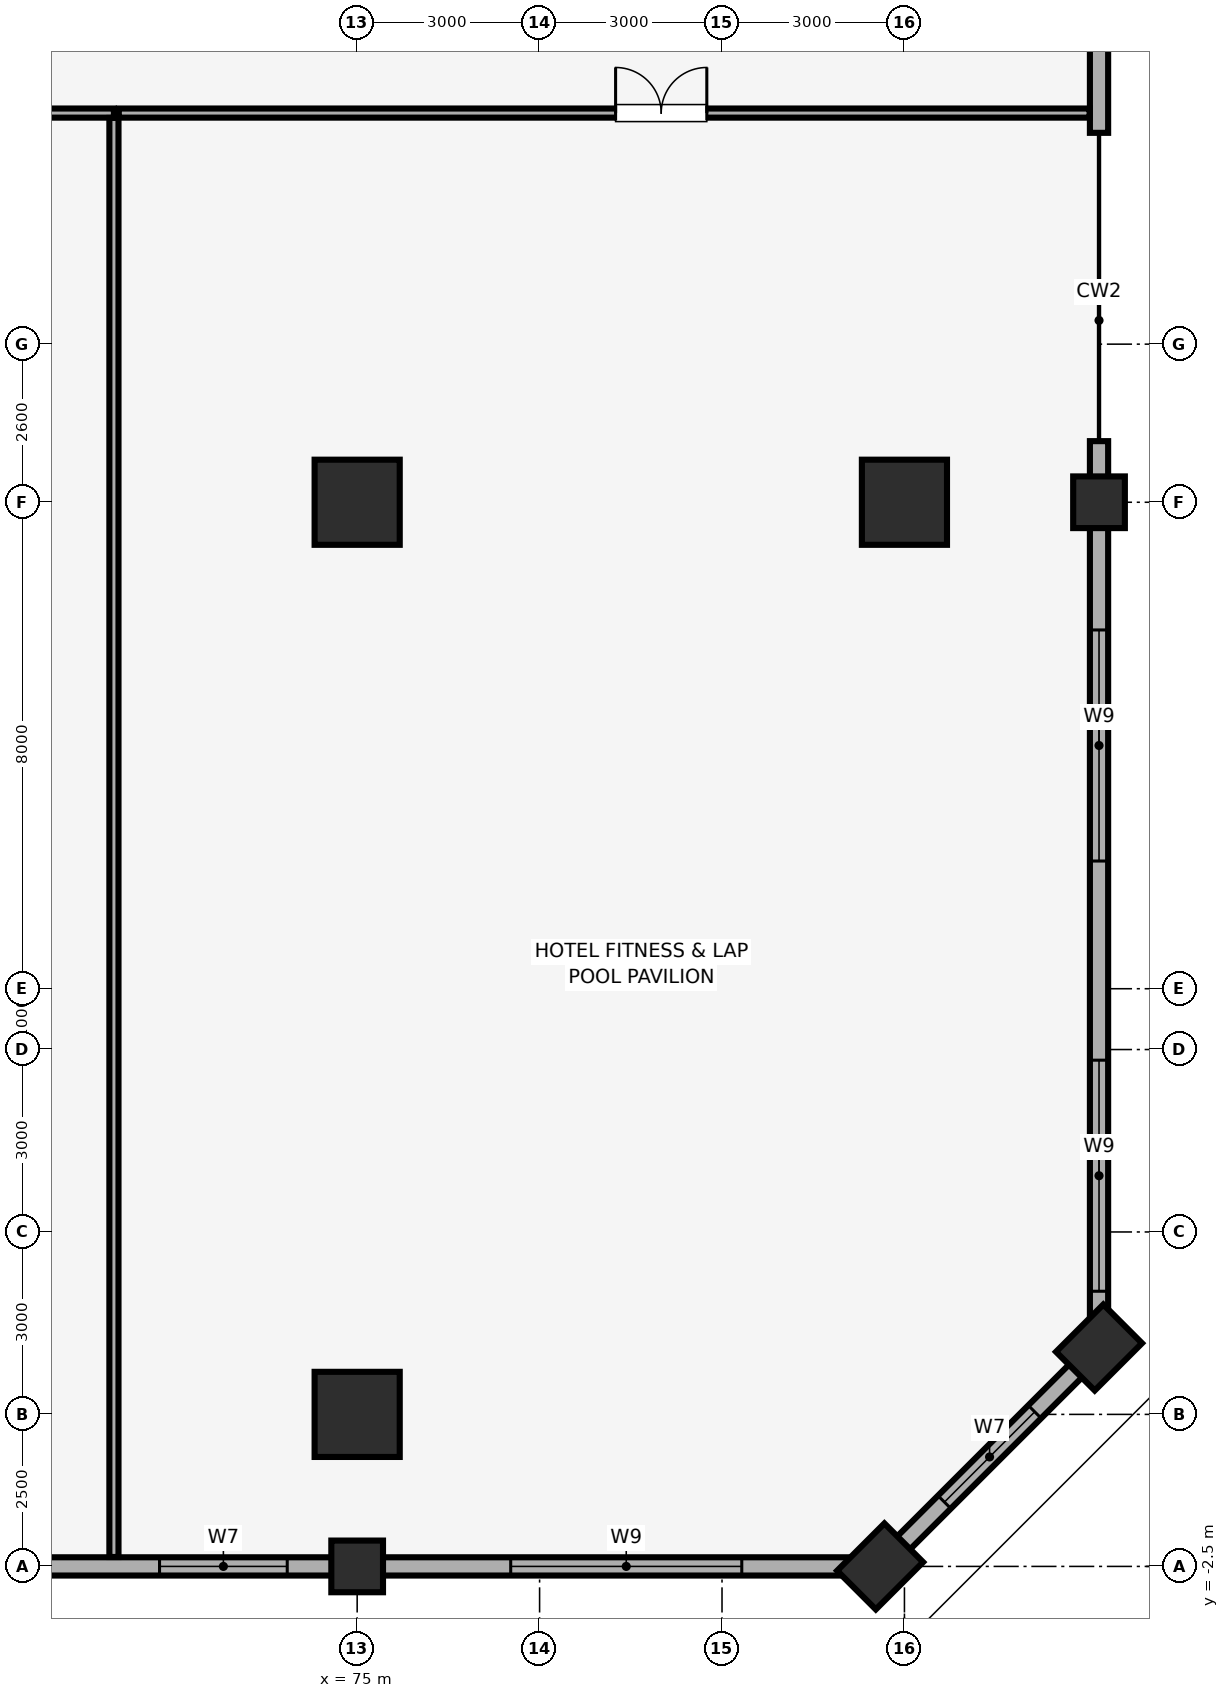
"""IFC4 building model, lengths in metres.
Left out: names, types, materials, properties, quantities, classifications, styles, units other than length and angle.
Written with IfcOpenShell. Run it as: python <this file> out.ifc"""

import sys

from ifc_helpers import new_model, si_unit, direction, frame, frame_2d, origin, origin_2d, place, context, subcontext, project, spatial, rectangle, extrude, element, fill, save


model = new_model("IFC4")
c1 = context("Model", 3, precision=1e-05, world=origin(), true_north=direction((0.0, 1.0)))
c2 = subcontext(c1, "Body", "Model", "MODEL_VIEW")
j1 = project(units=[si_unit("LENGTHUNIT", "METRE"), si_unit("PLANEANGLEUNIT", "RADIAN")], contexts=[c1])
p1 = place(None, origin())
s1 = spatial("IfcSite", under=j1, at=p1, CompositionType="ELEMENT")
p2 = place(p1, origin())
s2 = spatial("IfcBuilding", under=s1, at=p2, CompositionType="ELEMENT")
p3 = place(p2, frame((0.0, 0.0, 26.0)))
s3 = spatial("IfcBuildingStorey", under=s2, at=p3, CompositionType="ELEMENT", Elevation=26.0)
for number, where, z_axis, x_axis in (
    (1, (75.0, -2.5, 0.0), (0.0, 0.0, 1.0), (1.0, 0.0, 0.0)),
    (2, (87.2, 15.0, 0.0), (0.0, 0.0, 1.0), (1.0, 0.0, 0.0)),
):
    element("IfcColumn", number, at=place(p3, frame(where, z_axis=z_axis, x_axis=x_axis)), inside=s3, PredefinedType="COLUMN", context=c2, shape_type="SweptSolid", body=[
        extrude(rectangle(XDim=0.85, YDim=0.85, at=origin_2d()), origin(), (0.0, 0.0, 1.0), 5.16),
    ])
for number, where, z_axis, x_axis in (
    (3, (83.6, -2.5, 0.0), (0.0, 0.0, 1.0), (0.707, 0.707, 0.0)),
    (4, (87.2, 1.1, 0.0), (0.0, 0.0, 1.0), (0.707, 0.707, 0.0)),
):
    element("IfcColumn", number, at=place(p3, frame(where, z_axis=z_axis, x_axis=x_axis)), inside=s3, PredefinedType="PILASTER", context=c2, shape_type="SweptSolid", body=[
        extrude(rectangle(XDim=1.1, YDim=0.9, at=origin_2d()), origin(), (0.0, 0.0, 1.0), 5.16),
    ])
for number, where, z_axis, x_axis in (
    (5, (75.0, 0.0, 0.0), (0.0, 0.0, 1.0), (1.0, 0.0, 0.0)),
    (6, (75.0, 15.0, 0.0), (0.0, 0.0, 1.0), (1.0, 0.0, 0.0)),
    (7, (84.0, 15.0, 0.0), (0.0, 0.0, 1.0), (1.0, 0.0, 0.0)),
):
    element("IfcColumn", number, at=place(p3, frame(where, z_axis=z_axis, x_axis=x_axis)), inside=s3, PredefinedType="COLUMN", context=c2, shape_type="SweptSolid", body=[
        extrude(rectangle(XDim=1.4, YDim=1.4, at=origin_2d()), origin(), (0.0, 0.0, 1.0), 5.16),
    ])
p4 = place(p3, frame((66.875, -2.5, 0.0), z_axis=(0.0, 0.0, 1.0), x_axis=(1.0, 0.0, 0.0)))
e8 = element("IfcWall", 8, at=p4, inside=s3, PredefinedType="SOLIDWALL", context=c2, shape_type="SweptSolid", body=[
    extrude(rectangle(XDim=16.725, YDim=0.3, at=frame_2d((8.363, 0.0))), origin(), (0.0, 0.0, 1.0), 5.12),
])
p5 = place(p4, frame((4.875, 0.0, 0.85)))
e9 = element("IfcOpeningElement", 9, at=p5, cuts=e8, PredefinedType="OPENING", context=c2, shape_type="SweptSolid", body=[
    extrude(rectangle(XDim=2.1, YDim=1.6, at=frame_2d((1.05, 0.8))), frame((0.0, 0.16, 0.0), z_axis=(0.0, -1.0, 0.0), x_axis=(1.0, 0.0, 0.0)), (0.0, 0.0, 1.0), 0.32),
])
p6 = place(p4, frame((10.65, 0.0, 0.85)))
e10 = element("IfcOpeningElement", 10, at=p6, cuts=e8, PredefinedType="OPENING", context=c2, shape_type="SweptSolid", body=[
    extrude(rectangle(XDim=3.8, YDim=2.2, at=frame_2d((1.9, 1.1))), frame((0.0, 0.16, 0.0), z_axis=(0.0, -1.0, 0.0), x_axis=(1.0, 0.0, 0.0)), (0.0, 0.0, 1.0), 0.32),
])
p7 = place(p3, frame((83.6, -2.5, 0.0), z_axis=(0.0, 0.0, 1.0), x_axis=(0.707082803744, 0.707130757816, 0.0)))
e11 = element("IfcWall", 11, at=p7, inside=s3, PredefinedType="SOLIDWALL", context=c2, shape_type="SweptSolid", body=[
    extrude(rectangle(XDim=5.091, YDim=0.3, at=frame_2d((2.545, 0.0))), origin(), (0.0, 0.0, 1.0), 5.12),
])
p8 = place(p7, frame((1.496, 0.0, 0.85)))
e12 = element("IfcOpeningElement", 12, at=p8, cuts=e11, PredefinedType="OPENING", context=c2, shape_type="SweptSolid", body=[
    extrude(rectangle(XDim=2.1, YDim=1.6, at=frame_2d((1.05, 0.8))), frame((0.0, 0.16, 0.0), z_axis=(0.0, -1.0, 0.0), x_axis=(1.0, 0.0, 0.0)), (0.0, 0.0, 1.0), 0.32),
])
p9 = place(p3, frame((87.2, 1.1, 0.0), z_axis=(0.0, 0.0, 1.0), x_axis=(0.0, 1.0, 0.0)))
e13 = element("IfcWall", 13, at=p9, inside=s3, PredefinedType="SOLIDWALL", context=c2, shape_type="SweptSolid", body=[
    extrude(rectangle(XDim=14.905, YDim=0.3, at=frame_2d((7.452, 0.0))), origin(), (0.0, 0.0, 1.0), 5.12),
])
p10 = place(p9, frame((0.925, 0.0, 0.85)))
e14 = element("IfcOpeningElement", 14, at=p10, cuts=e13, PredefinedType="OPENING", context=c2, shape_type="SweptSolid", body=[
    extrude(rectangle(XDim=3.8, YDim=2.2, at=frame_2d((1.9, 1.1))), frame((0.0, 0.16, 0.0), z_axis=(0.0, -1.0, 0.0), x_axis=(1.0, 0.0, 0.0)), (0.0, 0.0, 1.0), 0.32),
])
p11 = place(p9, frame((8.0, 0.0, 0.85)))
e15 = element("IfcOpeningElement", 15, at=p11, cuts=e13, PredefinedType="OPENING", context=c2, shape_type="SweptSolid", body=[
    extrude(rectangle(XDim=3.8, YDim=2.2, at=frame_2d((1.9, 1.1))), frame((0.0, 0.16, 0.0), z_axis=(0.0, -1.0, 0.0), x_axis=(1.0, 0.0, 0.0)), (0.0, 0.0, 1.0), 0.32),
])
p12 = place(p3, frame((87.2, 21.075, 0.0), z_axis=(0.0, 0.0, 1.0), x_axis=(0.0, 1.0, 0.0)))
e16 = element("IfcWall", 16, at=p12, inside=s3, PredefinedType="SOLIDWALL", context=c2, shape_type="SweptSolid", body=[
    extrude(rectangle(XDim=3.05, YDim=0.3, at=frame_2d((1.525, 0.0))), origin(), (0.0, 0.0, 1.0), 5.12),
])
p13 = place(p3, frame((52.58, 21.4, 0.0), z_axis=(0.0, 0.0, 1.0), x_axis=(1.0, 0.0, 0.0)))
e17 = element("IfcWall", 17, at=p13, inside=s3, PredefinedType="PARTITIONING", context=c2, shape_type="SweptSolid", body=[
    extrude(rectangle(XDim=18.42, YDim=0.15, at=frame_2d((9.21, 0.0))), origin(), (0.0, 0.0, 1.0), 5.12),
])
p14 = place(p13, frame((8.67, 0.0, 0.0)))
e18 = element("IfcOpeningElement", 18, at=p14, cuts=e17, PredefinedType="OPENING", context=c2, shape_type="SweptSolid", body=[
    extrude(rectangle(XDim=1.5, YDim=2.25, at=frame_2d((0.75, 1.125))), frame((0.0, 0.085, 0.0), z_axis=(0.0, -1.0, 0.0), x_axis=(1.0, 0.0, 0.0)), (0.0, 0.0, 1.0), 0.17),
])
p15 = place(p3, frame((71.0, -2.345, 0.0), z_axis=(0.0, 0.0, 1.0), x_axis=(0.0, 1.0, 0.0)))
e19 = element("IfcWall", 19, at=p15, inside=s3, PredefinedType="PARTITIONING", context=c2, shape_type="SweptSolid", body=[
    extrude(rectangle(XDim=23.665, YDim=0.15, at=frame_2d((11.833, 0.0))), origin(), (0.0, 0.0, 1.0), 5.12),
])
p16 = place(p3, frame((71.08, 21.4, 0.0), z_axis=(0.0, 0.0, 1.0), x_axis=(1.0, 0.0, 0.0)))
e20 = element("IfcWall", 20, at=p16, inside=s3, PredefinedType="PARTITIONING", context=c2, shape_type="SweptSolid", body=[
    extrude(rectangle(XDim=15.965, YDim=0.15, at=frame_2d((7.982, 0.0))), origin(), (0.0, 0.0, 1.0), 5.12),
])
p17 = place(p16, frame((8.17, 0.0, 0.0)))
e21 = element("IfcOpeningElement", 21, at=p17, cuts=e20, PredefinedType="OPENING", context=c2, shape_type="SweptSolid", body=[
    extrude(rectangle(XDim=1.5, YDim=2.25, at=frame_2d((0.75, 1.125))), frame((0.0, 0.085, 0.0), z_axis=(0.0, -1.0, 0.0), x_axis=(1.0, 0.0, 0.0)), (0.0, 0.0, 1.0), 0.17),
])
p18 = place(p8, origin())
e22 = element("IfcWindow", 22, at=p18, inside=s3, PartitioningType="SINGLE_PANEL", PredefinedType="WINDOW", context=c2, shape_type="SweptSolid", body=[
    extrude(rectangle(XDim=2.1, YDim=1.6, at=frame_2d((1.05, 0.8))), frame((0.0, 0.03, 0.0), z_axis=(0.0, -1.0, 0.0), x_axis=(1.0, 0.0, 0.0)), (0.0, 0.0, 1.0), 0.06),
])
fill(e12, e22)
p19 = place(p5, origin())
e23 = element("IfcWindow", 23, at=p19, inside=s3, PartitioningType="SINGLE_PANEL", PredefinedType="WINDOW", context=c2, shape_type="SweptSolid", body=[
    extrude(rectangle(XDim=2.1, YDim=1.6, at=frame_2d((1.05, 0.8))), frame((0.0, 0.03, 0.0), z_axis=(0.0, -1.0, 0.0), x_axis=(1.0, 0.0, 0.0)), (0.0, 0.0, 1.0), 0.06),
])
fill(e9, e23)
p20 = place(p6, origin())
e24 = element("IfcWindow", 24, at=p20, inside=s3, PartitioningType="SINGLE_PANEL", PredefinedType="WINDOW", context=c2, shape_type="SweptSolid", body=[
    extrude(rectangle(XDim=3.8, YDim=2.2, at=frame_2d((1.9, 1.1))), frame((0.0, 0.03, 0.0), z_axis=(0.0, -1.0, 0.0), x_axis=(1.0, 0.0, 0.0)), (0.0, 0.0, 1.0), 0.06),
])
fill(e10, e24)
p21 = place(p10, origin())
e25 = element("IfcWindow", 25, at=p21, inside=s3, PartitioningType="SINGLE_PANEL", PredefinedType="WINDOW", context=c2, shape_type="SweptSolid", body=[
    extrude(rectangle(XDim=3.8, YDim=2.2, at=frame_2d((1.9, 1.1))), frame((0.0, 0.03, 0.0), z_axis=(0.0, -1.0, 0.0), x_axis=(1.0, 0.0, 0.0)), (0.0, 0.0, 1.0), 0.06),
])
fill(e14, e25)
p22 = place(p11, origin())
e26 = element("IfcWindow", 26, at=p22, inside=s3, PartitioningType="SINGLE_PANEL", PredefinedType="WINDOW", context=c2, shape_type="SweptSolid", body=[
    extrude(rectangle(XDim=3.8, YDim=2.2, at=frame_2d((1.9, 1.1))), frame((0.0, 0.03, 0.0), z_axis=(0.0, -1.0, 0.0), x_axis=(1.0, 0.0, 0.0)), (0.0, 0.0, 1.0), 0.06),
])
fill(e15, e26)
p23 = place(p17, origin())
e27 = element("IfcDoor", 27, at=p23, inside=s3, OperationType="DOUBLE_DOOR_SINGLE_SWING", PredefinedType="DOOR", context=c2, shape_type="SweptSolid", body=[
    extrude(rectangle(XDim=1.5, YDim=2.25, at=frame_2d((0.75, 1.125))), frame((0.0, 0.025, 0.0), z_axis=(0.0, -1.0, 0.0), x_axis=(1.0, 0.0, 0.0)), (0.0, 0.0, 1.0), 0.05),
])
fill(e21, e27)
save(model, sys.argv[1])
